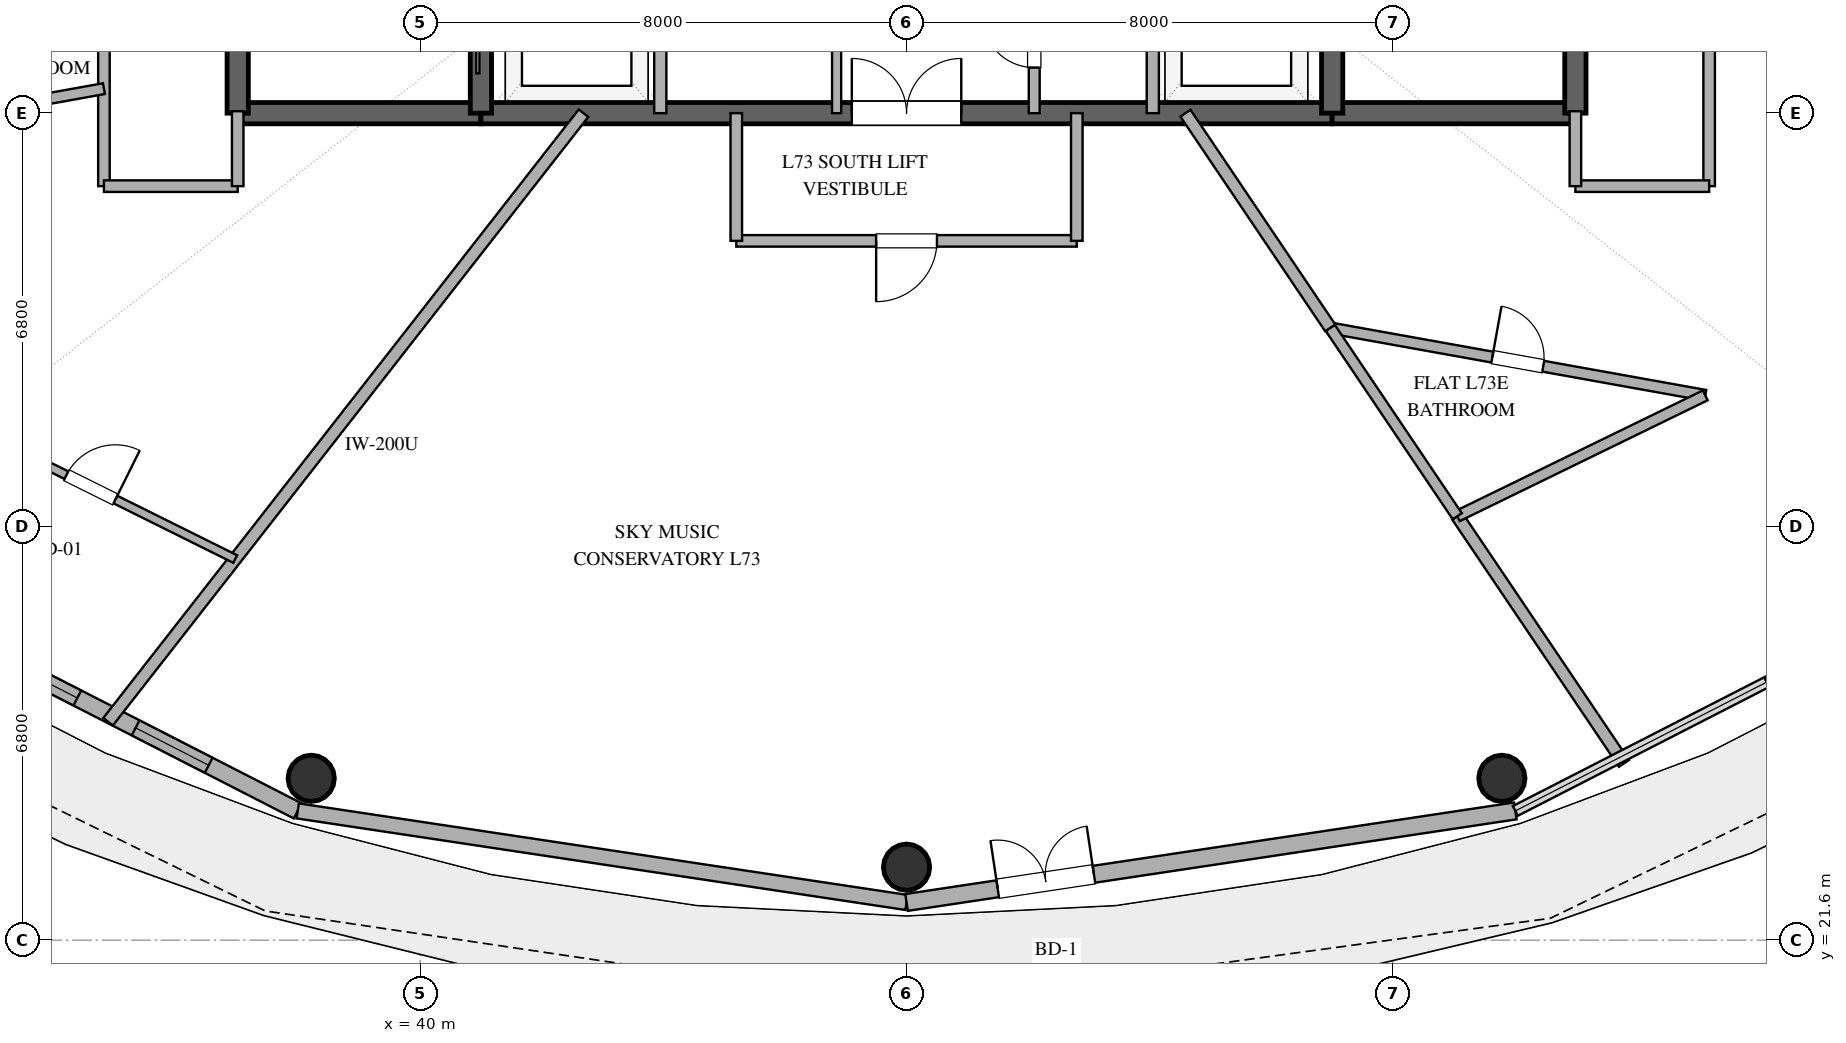
"""IFC4 building model, lengths in metres.
Left out: names, types, materials, properties, quantities, classifications, styles, units other than length and angle.
Written with IfcOpenShell. Run it as: python <this file> out.ifc"""

import sys

from ifc_helpers import new_model, si_unit, direction, frame, frame_2d, origin, origin_2d, place, context, subcontext, project, spatial, rectangle, hollow_circle, extrude, element, fill, save


model = new_model("IFC4")
c1 = context("Model", 3, precision=1e-05, world=origin(), true_north=direction((0.0, 1.0)))
c2 = subcontext(c1, "Body", "Model", "MODEL_VIEW")
j1 = project(units=[si_unit("LENGTHUNIT", "METRE"), si_unit("PLANEANGLEUNIT", "RADIAN")], contexts=[c1])
p1 = place(None, origin())
s1 = spatial("IfcSite", under=j1, at=p1, CompositionType="ELEMENT")
p2 = place(p1, origin())
s2 = spatial("IfcBuilding", under=s1, at=p2, CompositionType="ELEMENT")
p3 = place(p2, frame((0.0, 0.0, 283.8)))
s3 = spatial("IfcBuildingStorey", under=s2, at=p3, CompositionType="ELEMENT", Elevation=283.8)
p4 = place(p3, frame((37.0, 35.2, 0.0), z_axis=(0.0, 0.0, 1.0), x_axis=(1.0, 0.0, 0.0)))
e1 = element("IfcWall", 1, at=p4, inside=s3, PredefinedType="SHEAR", context=c2, shape_type="SweptSolid", body=[
    extrude(rectangle(XDim=4.0, YDim=0.35, at=frame_2d((2.0, 0.0))), origin(), (0.0, 0.0, 1.0), 3.37),
])
p5 = place(p3, frame((41.0, 35.2, 0.0), z_axis=(0.0, 0.0, 1.0), x_axis=(1.0, 0.0, 0.0)))
e2 = element("IfcWall", 2, at=p5, inside=s3, PredefinedType="SHEAR", context=c2, shape_type="SweptSolid", body=[
    extrude(rectangle(XDim=14.0, YDim=0.35, at=frame_2d((7.0, 0.0))), origin(), (0.0, 0.0, 1.0), 3.37),
])
p6 = place(p5, frame((6.1, 0.0, 0.0)))
e3 = element("IfcOpeningElement", 3, at=p6, cuts=e2, PredefinedType="OPENING", context=c2, shape_type="SweptSolid", body=[
    extrude(rectangle(XDim=1.8, YDim=2.25, at=frame_2d((0.9, 1.125))), frame((0.0, 0.185, 0.0), z_axis=(0.0, -1.0, 0.0), x_axis=(1.0, 0.0, 0.0)), (0.0, 0.0, 1.0), 0.37),
])
p7 = place(p3, frame((55.0, 35.2, 0.0), z_axis=(0.0, 0.0, 1.0), x_axis=(1.0, 0.0, 0.0)))
e4 = element("IfcWall", 4, at=p7, inside=s3, PredefinedType="SHEAR", context=c2, shape_type="SweptSolid", body=[
    extrude(rectangle(XDim=4.0, YDim=0.35, at=frame_2d((2.0, 0.0))), origin(), (0.0, 0.0, 1.0), 3.37),
])
p8 = place(p3, frame((37.0, 35.2, 0.0), z_axis=(0.0, 0.0, 1.0), x_axis=(0.0, 1.0, 0.0)))
e5 = element("IfcWall", 5, at=p8, inside=s3, PredefinedType="SHEAR", context=c2, shape_type="SweptSolid", body=[
    extrude(rectangle(XDim=13.6, YDim=0.35, at=frame_2d((6.8, 0.0))), origin(), (0.0, 0.0, 1.0), 3.37),
])
p9 = place(p8, frame((1.5, 0.0, 0.0)))
e6 = element("IfcOpeningElement", 6, at=p9, cuts=e5, PredefinedType="OPENING", context=c2, shape_type="SweptSolid", body=[
    extrude(rectangle(XDim=1.2, YDim=2.15, at=frame_2d((0.6, 1.075))), frame((0.0, 0.185, 0.0), z_axis=(0.0, -1.0, 0.0), x_axis=(1.0, 0.0, 0.0)), (0.0, 0.0, 1.0), 0.37),
])
p10 = place(p3, frame((59.0, 35.2, 0.0), z_axis=(0.0, 0.0, 1.0), x_axis=(0.0, 1.0, 0.0)))
e7 = element("IfcWall", 7, at=p10, inside=s3, PredefinedType="SHEAR", context=c2, shape_type="SweptSolid", body=[
    extrude(rectangle(XDim=13.6, YDim=0.35, at=frame_2d((6.8, 0.0))), origin(), (0.0, 0.0, 1.0), 3.37),
])
p11 = place(p10, frame((1.5, 0.0, 0.0)))
e8 = element("IfcOpeningElement", 8, at=p11, cuts=e7, PredefinedType="OPENING", context=c2, shape_type="SweptSolid", body=[
    extrude(rectangle(XDim=1.2, YDim=2.15, at=frame_2d((0.6, 1.075))), frame((0.0, 0.185, 0.0), z_axis=(0.0, -1.0, 0.0), x_axis=(1.0, 0.0, 0.0)), (0.0, 0.0, 1.0), 0.37),
])
p12 = place(p3, frame((41.0, 35.2, 0.0), z_axis=(0.0, 0.0, 1.0), x_axis=(0.0, 1.0, 0.0)))
e9 = element("IfcWall", 9, at=p12, inside=s3, PredefinedType="SHEAR", context=c2, shape_type="SweptSolid", body=[
    extrude(rectangle(XDim=13.6, YDim=0.35, at=frame_2d((6.8, 0.0))), origin(), (0.0, 0.0, 1.0), 3.37),
])
p13 = place(p12, frame((1.15, 0.0, 0.0)))
e10 = element("IfcOpeningElement", 10, at=p13, cuts=e9, PredefinedType="OPENING", context=c2, shape_type="SweptSolid", body=[
    extrude(rectangle(XDim=1.1, YDim=2.2, at=frame_2d((0.55, 1.1))), frame((0.0, 0.185, 0.0), z_axis=(0.0, -1.0, 0.0), x_axis=(1.0, 0.0, 0.0)), (0.0, 0.0, 1.0), 0.37),
])
p14 = place(p3, frame((55.0, 35.2, 0.0), z_axis=(0.0, 0.0, 1.0), x_axis=(0.0, 1.0, 0.0)))
e11 = element("IfcWall", 11, at=p14, inside=s3, PredefinedType="SHEAR", context=c2, shape_type="SweptSolid", body=[
    extrude(rectangle(XDim=13.6, YDim=0.35, at=frame_2d((6.8, 0.0))), origin(), (0.0, 0.0, 1.0), 3.37),
])
p15 = place(p14, frame((1.15, 0.0, 0.0)))
e12 = element("IfcOpeningElement", 12, at=p15, cuts=e11, PredefinedType="OPENING", context=c2, shape_type="SweptSolid", body=[
    extrude(rectangle(XDim=1.1, YDim=2.2, at=frame_2d((0.55, 1.1))), frame((0.0, 0.185, 0.0), z_axis=(0.0, -1.0, 0.0), x_axis=(1.0, 0.0, 0.0)), (0.0, 0.0, 1.0), 0.37),
])
for number, where, z_axis, x_axis in (
    (13, (38.209, 24.261, 0.0), (0.0, 0.0, 1.0), (1.0, 0.0, 0.0)),
    (14, (48.0, 22.8, 0.0), (0.0, 0.0, 1.0), (1.0, 0.0, 0.0)),
    (15, (57.791, 24.261, 0.0), (0.0, 0.0, 1.0), (1.0, 0.0, 0.0)),
):
    element("IfcColumn", number, at=place(p3, frame(where, z_axis=z_axis, x_axis=x_axis)), inside=s3, PredefinedType="COLUMN", context=c2, shape_type="SweptSolid", body=[
        extrude(hollow_circle(Radius=0.381, WallThickness=0.025, at=origin_2d()), origin(), (0.0, 0.0, 1.0), 3.37),
    ])
p16 = place(p3, frame((29.617, 28.013, 0.0), z_axis=(0.0, 0.0, 1.0), x_axis=(0.890007394051, -0.455946091699, 0.0)))
e16 = element("IfcWall", 16, at=p16, inside=s3, PredefinedType="SOLIDWALL", context=c2, shape_type="SweptSolid", body=[
    extrude(rectangle(XDim=9.404, YDim=0.28, at=frame_2d((4.702, 0.0))), origin(), (0.0, 0.0, 1.0), 3.37),
])
p17 = place(p16, frame((1.954, 0.0, 0.85)))
e17 = element("IfcOpeningElement", 17, at=p17, cuts=e16, PredefinedType="OPENING", context=c2, shape_type="SweptSolid", body=[
    extrude(rectangle(XDim=1.5, YDim=1.8, at=frame_2d((0.75, 0.9))), frame((0.0, 0.15, 0.0), z_axis=(0.0, -1.0, 0.0), x_axis=(1.0, 0.0, 0.0)), (0.0, 0.0, 1.0), 0.3),
])
p18 = place(p16, frame((3.831, 0.0, 0.85)))
e18 = element("IfcOpeningElement", 18, at=p18, cuts=e16, PredefinedType="OPENING", context=c2, shape_type="SweptSolid", body=[
    extrude(rectangle(XDim=1.5, YDim=1.8, at=frame_2d((0.75, 0.9))), frame((0.0, 0.15, 0.0), z_axis=(0.0, -1.0, 0.0), x_axis=(1.0, 0.0, 0.0)), (0.0, 0.0, 1.0), 0.3),
])
p19 = place(p16, frame((6.408, 0.0, 0.85)))
e19 = element("IfcOpeningElement", 19, at=p19, cuts=e16, PredefinedType="OPENING", context=c2, shape_type="SweptSolid", body=[
    extrude(rectangle(XDim=1.35, YDim=1.8, at=frame_2d((0.675, 0.9))), frame((0.0, 0.15, 0.0), z_axis=(0.0, -1.0, 0.0), x_axis=(1.0, 0.0, 0.0)), (0.0, 0.0, 1.0), 0.3),
])
p20 = place(p3, frame((37.987, 23.726, 0.0), z_axis=(0.0, 0.0, 1.0), x_axis=(0.988882522213, -0.148698881169, 0.0)))
e20 = element("IfcWall", 20, at=p20, inside=s3, PredefinedType="SOLIDWALL", context=c2, shape_type="SweptSolid", body=[
    extrude(rectangle(XDim=10.125, YDim=0.25, at=frame_2d((5.062, 0.0))), origin(), (0.0, 0.0, 1.0), 3.37),
])
p21 = place(p3, frame((48.0, 22.22, 0.0), z_axis=(0.0, 0.0, 1.0), x_axis=(0.988882522213, 0.148698881169, 0.0)))
e21 = element("IfcWall", 21, at=p21, inside=s3, PredefinedType="SOLIDWALL", context=c2, shape_type="SweptSolid", body=[
    extrude(rectangle(XDim=10.125, YDim=0.28, at=frame_2d((5.062, 0.0))), origin(), (0.0, 0.0, 1.0), 3.37),
])
p22 = place(p21, frame((1.516, 0.0, 0.0)))
e22 = element("IfcOpeningElement", 22, at=p22, cuts=e21, PredefinedType="OPENING", context=c2, shape_type="SweptSolid", body=[
    extrude(rectangle(XDim=1.6, YDim=2.25, at=frame_2d((0.8, 1.125))), frame((0.0, 0.15, 0.0), z_axis=(0.0, -1.0, 0.0), x_axis=(1.0, 0.0, 0.0)), (0.0, 0.0, 1.0), 0.3),
])
for number, where, z_axis, x_axis in (
    (23, (43.95, 35.2, 0.0), (0.0, 0.0, 1.0), (0.0, 1.0, 0.0)),
    (24, (52.05, 35.2, 0.0), (0.0, 0.0, 1.0), (0.0, 1.0, 0.0)),
):
    element("IfcWall", number, at=place(p3, frame(where, z_axis=z_axis, x_axis=x_axis)), inside=s3, PredefinedType="SOLIDWALL", context=c2, shape_type="SweptSolid", body=[
        extrude(rectangle(XDim=3.2, YDim=0.2, at=frame_2d((1.6, 0.0))), origin(), (0.0, 0.0, 1.0), 2.73),
    ])
p23 = place(p3, frame((46.85, 35.2, 0.0), z_axis=(0.0, 0.0, 1.0), x_axis=(0.0, 1.0, 0.0)))
e25 = element("IfcWall", 25, at=p23, inside=s3, PredefinedType="PARTITIONING", context=c2, shape_type="SweptSolid", body=[
    extrude(rectangle(XDim=3.2, YDim=0.15, at=frame_2d((1.6, 0.0))), origin(), (0.0, 0.0, 1.0), 2.73),
])
p24 = place(p23, frame((1.15, 0.0, 0.0)))
e26 = element("IfcOpeningElement", 26, at=p24, cuts=e25, PredefinedType="OPENING", context=c2, shape_type="SweptSolid", body=[
    extrude(rectangle(XDim=0.9, YDim=2.15, at=frame_2d((0.45, 1.075))), frame((0.0, 0.085, 0.0), z_axis=(0.0, -1.0, 0.0), x_axis=(1.0, 0.0, 0.0)), (0.0, 0.0, 1.0), 0.17),
])
p25 = place(p3, frame((50.1, 35.2, 0.0), z_axis=(0.0, 0.0, 1.0), x_axis=(0.0, 1.0, 0.0)))
e27 = element("IfcWall", 27, at=p25, inside=s3, PredefinedType="PLUMBINGWALL", context=c2, shape_type="SweptSolid", body=[
    extrude(rectangle(XDim=2.45, YDim=0.18, at=frame_2d((1.225, 0.0))), origin(), (0.0, 0.0, 1.0), 2.73),
])
p26 = place(p25, frame((0.75, 0.0, 0.0)))
e28 = element("IfcOpeningElement", 28, at=p26, cuts=e27, PredefinedType="OPENING", context=c2, shape_type="SweptSolid", body=[
    extrude(rectangle(XDim=0.85, YDim=2.1, at=frame_2d((0.425, 1.05))), frame((0.0, 0.1, 0.0), z_axis=(0.0, -1.0, 0.0), x_axis=(1.0, 0.0, 0.0)), (0.0, 0.0, 1.0), 0.2),
])
p27 = place(p3, frame((61.2, 50.9, 0.0), z_axis=(0.0, 0.0, 1.0), x_axis=(0.0, -1.0, 0.0)))
e29 = element("IfcWall", 29, at=p27, inside=s3, PredefinedType="PARTITIONING", context=c2, shape_type="SweptSolid", body=[
    extrude(rectangle(XDim=16.9, YDim=0.19, at=frame_2d((8.45, 0.0))), origin(), (0.0, 0.0, 1.0), 2.73),
])
p28 = place(p27, frame((8.873, 0.0, 0.0)))
e30 = element("IfcOpeningElement", 30, at=p28, cuts=e29, PredefinedType="OPENING", context=c2, shape_type="SweptSolid", body=[
    extrude(rectangle(XDim=1.0, YDim=2.2, at=frame_2d((0.5, 1.1))), frame((0.0, 0.105, 0.0), z_axis=(0.0, -1.0, 0.0), x_axis=(1.0, 0.0, 0.0)), (0.0, 0.0, 1.0), 0.21),
])
p29 = place(p3, frame((42.687, 35.2, 0.0), z_axis=(0.0, 0.0, 1.0), x_axis=(-0.615663811723, -0.788008928208, 0.0)))
e31 = element("IfcWall", 31, at=p29, inside=s3, PredefinedType="PARTITIONING", context=c2, shape_type="SweptSolid", body=[
    extrude(rectangle(XDim=12.701, YDim=0.2, at=frame_2d((6.351, 0.0))), origin(), (0.0, 0.0, 1.0), 2.73),
])
p30 = place(p3, frame((34.8, 34.0, 0.0), z_axis=(0.0, 0.0, 1.0), x_axis=(0.0, 1.0, 0.0)))
e32 = element("IfcWall", 32, at=p30, inside=s3, PredefinedType="PARTITIONING", context=c2, shape_type="SweptSolid", body=[
    extrude(rectangle(XDim=16.9, YDim=0.19, at=frame_2d((8.45, 0.0))), origin(), (0.0, 0.0, 1.0), 2.73),
])
p31 = place(p30, frame((7.627, 0.0, 0.0)))
e33 = element("IfcOpeningElement", 33, at=p31, cuts=e32, PredefinedType="OPENING", context=c2, shape_type="SweptSolid", body=[
    extrude(rectangle(XDim=1.0, YDim=2.2, at=frame_2d((0.5, 1.1))), frame((0.0, 0.105, 0.0), z_axis=(0.0, -1.0, 0.0), x_axis=(1.0, 0.0, 0.0)), (0.0, 0.0, 1.0), 0.21),
])
p32 = place(p3, frame((54.97, 31.667, 0.0), z_axis=(0.0, 0.0, 1.0), x_axis=(0.98424617738, -0.176803456736, 0.0)))
e34 = element("IfcWall", 34, at=p32, inside=s3, PredefinedType="PLUMBINGWALL", context=c2, shape_type="SweptSolid", body=[
    extrude(rectangle(XDim=6.265, YDim=0.18, at=frame_2d((3.132, 0.0))), origin(), (0.0, 0.0, 1.0), 2.73),
])
p33 = place(p32, frame((2.708, 0.0, 0.0)))
e35 = element("IfcOpeningElement", 35, at=p33, cuts=e34, PredefinedType="OPENING", context=c2, shape_type="SweptSolid", body=[
    extrude(rectangle(XDim=0.85, YDim=2.1, at=frame_2d((0.425, 1.05))), frame((0.0, 0.1, 0.0), z_axis=(0.0, -1.0, 0.0), x_axis=(1.0, 0.0, 0.0)), (0.0, 0.0, 1.0), 0.2),
])
p34 = place(p3, frame((34.8, 37.964, 0.0), z_axis=(0.0, 0.0, 1.0), x_axis=(-0.956308169094, -0.292360540641, 0.0)))
e36 = element("IfcWall", 36, at=p34, inside=s3, PredefinedType="PLUMBINGWALL", context=c2, shape_type="SweptSolid", body=[
    extrude(rectangle(XDim=6.028, YDim=0.18, at=frame_2d((3.014, 0.0))), origin(), (0.0, 0.0, 1.0), 2.73),
])
p35 = place(p34, frame((2.589, 0.0, 0.0)))
e37 = element("IfcOpeningElement", 37, at=p35, cuts=e36, PredefinedType="OPENING", context=c2, shape_type="SweptSolid", body=[
    extrude(rectangle(XDim=0.85, YDim=2.1, at=frame_2d((0.425, 1.05))), frame((0.0, 0.1, 0.0), z_axis=(0.0, -1.0, 0.0), x_axis=(1.0, 0.0, 0.0)), (0.0, 0.0, 1.0), 0.2),
])
p36 = place(p3, frame((50.8, 33.1, 0.0), z_axis=(0.0, 0.0, 1.0), x_axis=(-1.0, 0.0, 0.0)))
e38 = element("IfcWall", 38, at=p36, inside=s3, PredefinedType="PARTITIONING", context=c2, shape_type="SweptSolid", body=[
    extrude(rectangle(XDim=5.6, YDim=0.19, at=frame_2d((2.8, 0.0))), origin(), (0.0, 0.0, 1.0), 2.73),
])
p37 = place(p36, frame((2.3, 0.0, 0.0)))
e39 = element("IfcOpeningElement", 39, at=p37, cuts=e38, PredefinedType="OPENING", context=c2, shape_type="SweptSolid", body=[
    extrude(rectangle(XDim=1.0, YDim=2.2, at=frame_2d((0.5, 1.1))), frame((0.0, 0.105, 0.0), z_axis=(0.0, -1.0, 0.0), x_axis=(1.0, 0.0, 0.0)), (0.0, 0.0, 1.0), 0.21),
])
p38 = place(p3, frame((32.212, 30.226, 0.0), z_axis=(0.0, 0.0, 1.0), x_axis=(0.895575883974, -0.444908795197, 0.0)))
e40 = element("IfcWall", 40, at=p38, inside=s3, PredefinedType="PARTITIONING", context=c2, shape_type="SweptSolid", body=[
    extrude(rectangle(XDim=5.3, YDim=0.14, at=frame_2d((2.65, 0.0))), origin(), (0.0, 0.0, 1.0), 2.73),
])
p39 = place(p38, frame((2.2, 0.0, 0.0)))
e41 = element("IfcOpeningElement", 41, at=p39, cuts=e40, PredefinedType="OPENING", context=c2, shape_type="SweptSolid", body=[
    extrude(rectangle(XDim=0.9, YDim=2.1, at=frame_2d((0.45, 1.05))), frame((0.0, 0.08, 0.0), z_axis=(0.0, -1.0, 0.0), x_axis=(1.0, 0.0, 0.0)), (0.0, 0.0, 1.0), 0.16),
])
p40 = place(p3, frame((59.799, 24.507, 0.0), z_axis=(0.0, 0.0, 1.0), x_axis=(-0.559196589516, 0.829035086274, 0.0)))
e42 = element("IfcWall", 42, at=p40, inside=s3, PredefinedType="PARTITIONING", context=c2, shape_type="SweptSolid", body=[
    extrude(rectangle(XDim=4.903, YDim=0.2, at=frame_2d((2.451, 0.0))), origin(), (0.0, 0.0, 1.0), 2.73),
])
p41 = place(p3, frame((30.265, 34.789, 0.0), z_axis=(0.0, 0.0, 1.0), x_axis=(0.984250881723, 0.176777266148, 0.0)))
e43 = element("IfcWall", 43, at=p41, inside=s3, PredefinedType="PLUMBINGWALL", context=c2, shape_type="SweptSolid", body=[
    extrude(rectangle(XDim=4.607, YDim=0.18, at=frame_2d((2.304, 0.0))), origin(), (0.0, 0.0, 1.0), 2.73),
])
p42 = place(p3, frame((61.136, 30.559, 0.0), z_axis=(0.0, 0.0, 1.0), x_axis=(-0.898933361371, -0.438085393291, 0.0)))
e44 = element("IfcWall", 44, at=p42, inside=s3, PredefinedType="PLUMBINGWALL", context=c2, shape_type="SweptSolid", body=[
    extrude(rectangle(XDim=4.537, YDim=0.18, at=frame_2d((2.269, 0.0))), origin(), (0.0, 0.0, 1.0), 2.73),
])
p43 = place(p3, frame((54.97, 31.667, 0.0), z_axis=(0.0, 0.0, 1.0), x_axis=(-0.559200276542, 0.829032599308, 0.0)))
e45 = element("IfcWall", 45, at=p43, inside=s3, PredefinedType="PARTITIONING", context=c2, shape_type="SweptSolid", body=[
    extrude(rectangle(XDim=4.261, YDim=0.2, at=frame_2d((2.131, 0.0))), origin(), (0.0, 0.0, 1.0), 2.73),
])
p44 = place(p3, frame((57.058, 28.572, 0.0), z_axis=(0.0, 0.0, 1.0), x_axis=(-0.559219016168, 0.82901995872, 0.0)))
e46 = element("IfcWall", 46, at=p44, inside=s3, PredefinedType="PLUMBINGWALL", context=c2, shape_type="SweptSolid", body=[
    extrude(rectangle(XDim=3.734, YDim=0.18, at=frame_2d((1.867, 0.0))), origin(), (0.0, 0.0, 1.0), 2.73),
])
for number, where, z_axis, x_axis in (
    (47, (37.0, 34.0, 0.0), (0.0, 0.0, 1.0), (-1.0, 0.0, 0.0)),
    (48, (61.2, 34.0, 0.0), (0.0, 0.0, 1.0), (-1.0, 0.0, 0.0)),
):
    element("IfcWall", number, at=place(p3, frame(where, z_axis=z_axis, x_axis=x_axis)), inside=s3, PredefinedType="PARTITIONING", context=c2, shape_type="SweptSolid", body=[
        extrude(rectangle(XDim=2.2, YDim=0.19, at=frame_2d((1.1, 0.0))), origin(), (0.0, 0.0, 1.0), 2.73),
    ])
for number, where, z_axis, x_axis in (
    (49, (50.8, 35.2, 0.0), (0.0, 0.0, 1.0), (0.0, -1.0, 0.0)),
    (50, (45.2, 33.1, 0.0), (0.0, 0.0, 1.0), (0.0, 1.0, 0.0)),
):
    element("IfcWall", number, at=place(p3, frame(where, z_axis=z_axis, x_axis=x_axis)), inside=s3, PredefinedType="PARTITIONING", context=c2, shape_type="SweptSolid", body=[
        extrude(rectangle(XDim=2.1, YDim=0.19, at=frame_2d((1.05, 0.0))), origin(), (0.0, 0.0, 1.0), 2.73),
    ])
for number, where, z_axis, x_axis in (
    (51, (37.0, 35.232, 0.0), (0.0, 0.0, 1.0), (0.0, -1.0, 0.0)),
    (52, (59.0, 34.0, 0.0), (0.0, 0.0, 1.0), (0.0, 1.0, 0.0)),
):
    element("IfcWall", number, at=place(p3, frame(where, z_axis=z_axis, x_axis=x_axis)), inside=s3, PredefinedType="PARTITIONING", context=c2, shape_type="SweptSolid", body=[
        extrude(rectangle(XDim=1.232, YDim=0.19, at=frame_2d((0.616, 0.0))), origin(), (0.0, 0.0, 1.0), 2.73),
    ])
p45 = place(p18, origin())
e53 = element("IfcWindow", 53, at=p45, inside=s3, PartitioningType="SINGLE_PANEL", PredefinedType="WINDOW", context=c2, shape_type="SweptSolid", body=[
    extrude(rectangle(XDim=1.5, YDim=1.8, at=frame_2d((0.75, 0.9))), frame((0.0, 0.03, 0.0), z_axis=(0.0, -1.0, 0.0), x_axis=(1.0, 0.0, 0.0)), (0.0, 0.0, 1.0), 0.06),
])
fill(e18, e53)
p46 = place(p19, origin())
e54 = element("IfcWindow", 54, at=p46, inside=s3, PartitioningType="SINGLE_PANEL", PredefinedType="WINDOW", context=c2, shape_type="SweptSolid", body=[
    extrude(rectangle(XDim=1.35, YDim=1.8, at=frame_2d((0.675, 0.9))), frame((0.0, 0.03, 0.0), z_axis=(0.0, -1.0, 0.0), x_axis=(1.0, 0.0, 0.0)), (0.0, 0.0, 1.0), 0.06),
])
fill(e19, e54)
p47 = place(p22, origin())
e55 = element("IfcDoor", 55, at=p47, inside=s3, OperationType="DOUBLE_DOOR_SINGLE_SWING", PredefinedType="DOOR", context=c2, shape_type="SweptSolid", body=[
    extrude(rectangle(XDim=1.6, YDim=2.25, at=frame_2d((0.8, 1.125))), frame((0.0, 0.025, 0.0), z_axis=(0.0, -1.0, 0.0), x_axis=(1.0, 0.0, 0.0)), (0.0, 0.0, 1.0), 0.05),
])
fill(e22, e55)
p48 = place(p6, origin())
e56 = element("IfcDoor", 56, at=p48, inside=s3, OperationType="DOUBLE_DOOR_SINGLE_SWING", PredefinedType="DOOR", context=c2, shape_type="SweptSolid", body=[
    extrude(rectangle(XDim=1.8, YDim=2.25, at=frame_2d((0.9, 1.125))), frame((0.0, 0.025, 0.0), z_axis=(0.0, -1.0, 0.0), x_axis=(1.0, 0.0, 0.0)), (0.0, 0.0, 1.0), 0.05),
])
fill(e3, e56)
p49 = place(p26, origin())
e57 = element("IfcDoor", 57, at=p49, inside=s3, OperationType="SINGLE_SWING_RIGHT", PredefinedType="DOOR", context=c2, shape_type="SweptSolid", body=[
    extrude(rectangle(XDim=0.85, YDim=2.1, at=frame_2d((0.425, 1.05))), frame((0.0, 0.025, 0.0), z_axis=(0.0, -1.0, 0.0), x_axis=(1.0, 0.0, 0.0)), (0.0, 0.0, 1.0), 0.05),
])
fill(e28, e57)
p50 = place(p33, origin())
e58 = element("IfcDoor", 58, at=p50, inside=s3, OperationType="SINGLE_SWING_LEFT", PredefinedType="DOOR", context=c2, shape_type="SweptSolid", body=[
    extrude(rectangle(XDim=0.85, YDim=2.1, at=frame_2d((0.425, 1.05))), frame((0.0, 0.025, 0.0), z_axis=(0.0, -1.0, 0.0), x_axis=(1.0, 0.0, 0.0)), (0.0, 0.0, 1.0), 0.05),
])
fill(e35, e58)
p51 = place(p37, origin())
e59 = element("IfcDoor", 59, at=p51, inside=s3, OperationType="SINGLE_SWING_RIGHT", PredefinedType="DOOR", context=c2, shape_type="SweptSolid", body=[
    extrude(rectangle(XDim=1.0, YDim=2.2, at=frame_2d((0.5, 1.1))), frame((0.0, 0.025, 0.0), z_axis=(0.0, -1.0, 0.0), x_axis=(1.0, 0.0, 0.0)), (0.0, 0.0, 1.0), 0.05),
])
fill(e39, e59)
p52 = place(p39, origin())
e60 = element("IfcDoor", 60, at=p52, inside=s3, OperationType="SINGLE_SWING_RIGHT", PredefinedType="DOOR", context=c2, shape_type="SweptSolid", body=[
    extrude(rectangle(XDim=0.9, YDim=2.1, at=frame_2d((0.45, 1.05))), frame((0.0, 0.025, 0.0), z_axis=(0.0, -1.0, 0.0), x_axis=(1.0, 0.0, 0.0)), (0.0, 0.0, 1.0), 0.05),
])
fill(e41, e60)
save(model, sys.argv[1])
